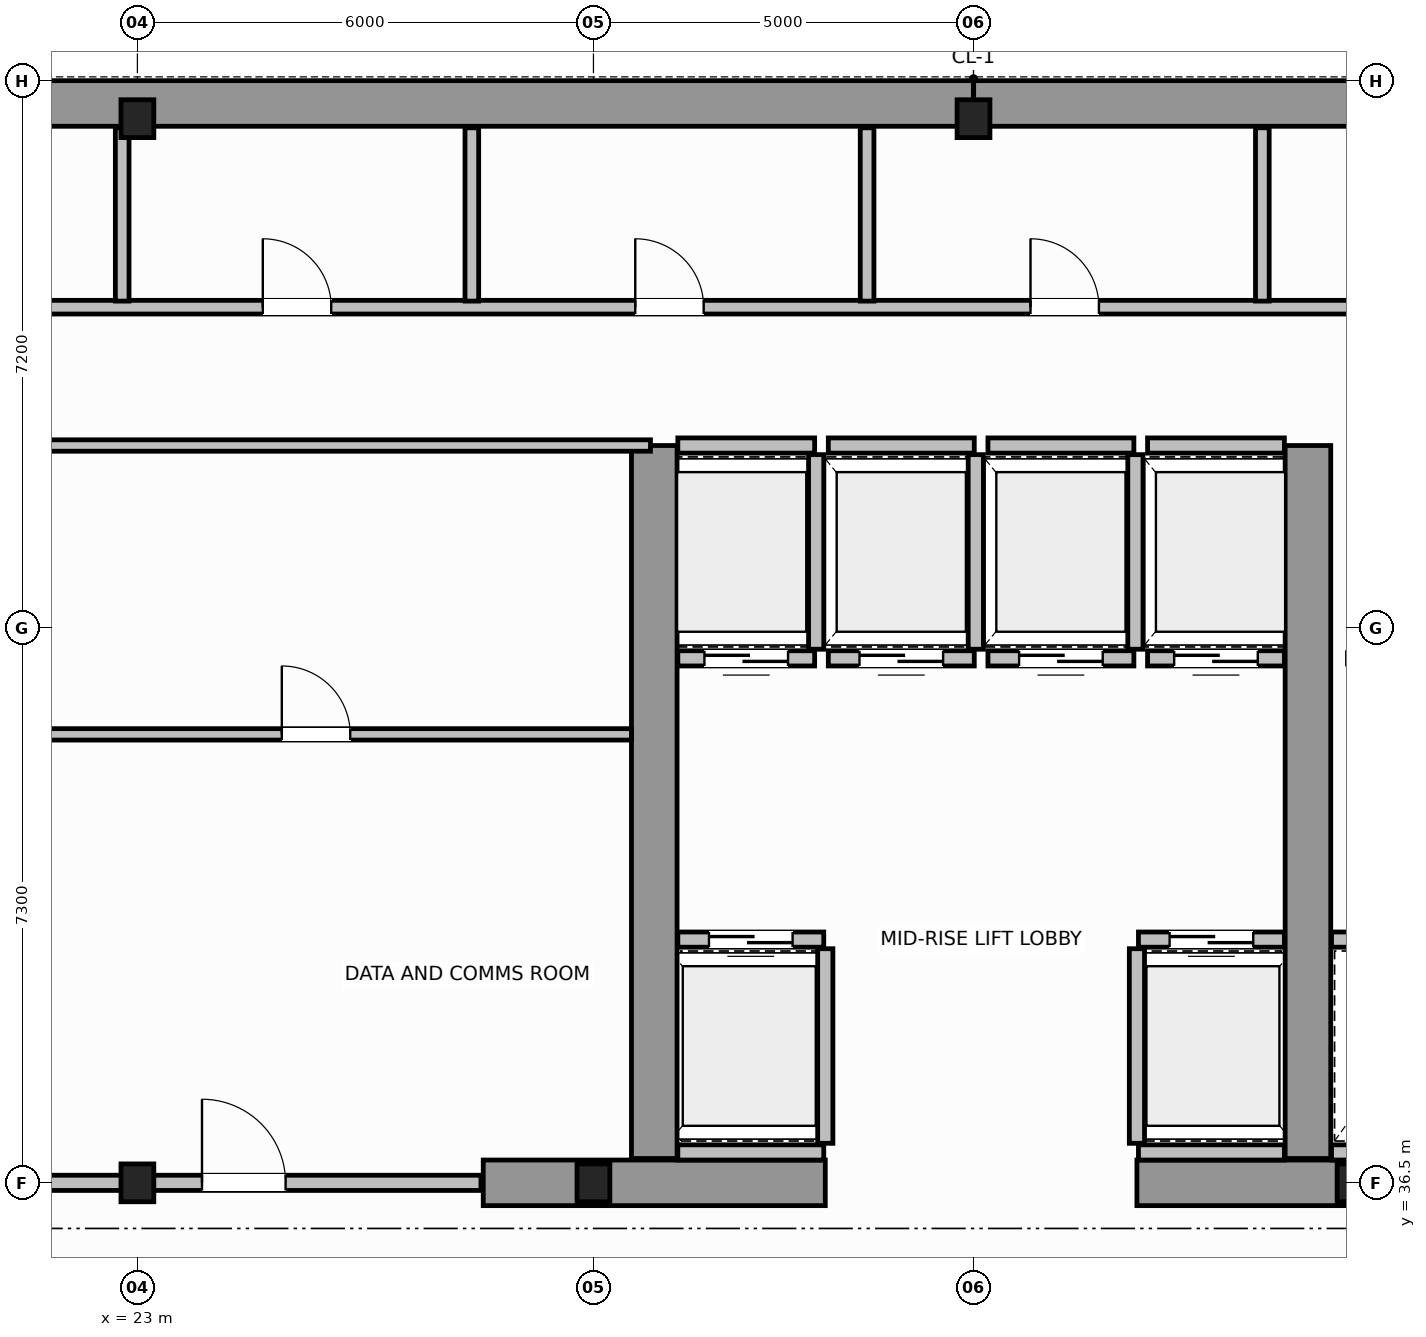
"""IFC4 building model, lengths in metres.
Left out: names, types, materials, properties, quantities, classifications, styles, units other than length and angle.
Written with IfcOpenShell. Run it as: python <this file> out.ifc"""

import sys

from ifc_helpers import new_model, si_unit, direction, frame, frame_2d, origin, origin_2d, place, context, subcontext, project, spatial, rectangle, i_section, extrude, source, transform, mapped, element, fill, save


model = new_model("IFC4")
c1 = context("Model", 3, precision=1e-05, world=origin(), true_north=direction((0.0, 1.0)))
c2 = subcontext(c1, "Body", "Model", "MODEL_VIEW")
j1 = project(units=[si_unit("LENGTHUNIT", "METRE"), si_unit("PLANEANGLEUNIT", "RADIAN")], contexts=[c1])
p1 = place(None, origin())
s1 = spatial("IfcSite", under=j1, at=p1, CompositionType="ELEMENT")
p2 = place(p1, origin())
s2 = spatial("IfcBuilding", under=s1, at=p2, CompositionType="ELEMENT")
p3 = place(p2, frame((0.0, 0.0, 188.0)))
s3 = spatial("IfcBuildingStorey", under=s2, at=p3, CompositionType="ELEMENT", Elevation=188.0)
m1 = source(origin(), c2, "Body", "SweptSolid", [
    extrude(i_section(OverallWidth=0.432, OverallDepth=0.498, WebThickness=0.055, FlangeThickness=0.068, FilletRadius=0.015, at=origin_2d()), origin(), (0.0, 0.0, 1.0), 3.8),
])
for number, where, z_axis, x_axis in (
    (1, (23.0, 36.5, 0.0), (0.0, 0.0, 1.0), (1.0, 0.0, 0.0)),
    (2, (29.0, 36.5, 0.0), (0.0, 0.0, 1.0), (1.0, 0.0, 0.0)),
    (3, (39.0, 36.5, 0.0), (0.0, 0.0, 1.0), (1.0, 0.0, 0.0)),
    (4, (23.0, 50.5, 0.0), (0.0, 0.0, 1.0), (1.0, 0.0, 0.0)),
    (5, (34.0, 50.5, 0.0), (0.0, 0.0, 1.0), (1.0, 0.0, 0.0)),
):
    element("IfcColumn", number, at=place(p3, frame(where, z_axis=z_axis, x_axis=x_axis)), inside=s3, PredefinedType="COLUMN", context=c2, shape_type="MappedRepresentation", body=[
        mapped(m1, transform((0.0, 0.0, 0.0), scale=1.0)),
    ])
for number, where, z_axis, x_axis in (
    (6, (14.304, 50.7, 0.0), (0.0, 0.0, 1.0), (1.0, 0.0, 0.0)),
    (7, (34.002, 50.7, 0.0), (0.0, 0.0, 1.0), (1.0, 0.0, 0.0)),
):
    element("IfcWall", number, at=place(p3, frame(where, z_axis=z_axis, x_axis=x_axis)), inside=s3, PredefinedType="SHEAR", context=c2, shape_type="SweptSolid", body=[
        extrude(rectangle(XDim=19.694, YDim=0.6, at=frame_2d((9.847, 0.0))), origin(), (0.0, 0.0, 1.0), 3.8),
    ])
for number, where, z_axis, x_axis in (
    (8, (27.55, 36.5, 0.0), (0.0, 0.0, 1.0), (1.0, 0.0, 0.0)),
    (9, (36.15, 36.5, 0.0), (0.0, 0.0, 1.0), (1.0, 0.0, 0.0)),
):
    element("IfcWall", number, at=place(p3, frame(where, z_axis=z_axis, x_axis=x_axis)), inside=s3, PredefinedType="SHEAR", context=c2, shape_type="SweptSolid", body=[
        extrude(rectangle(XDim=4.5, YDim=0.6, at=frame_2d((2.25, 0.0))), origin(), (0.0, 0.0, 1.0), 3.8),
    ])
for number, where, z_axis, x_axis in (
    (10, (29.8, 36.82, 0.0), (0.0, 0.0, 1.0), (0.0, 1.0, 0.0)),
    (11, (38.4, 36.82, 0.0), (0.0, 0.0, 1.0), (0.0, 1.0, 0.0)),
):
    element("IfcWall", number, at=place(p3, frame(where, z_axis=z_axis, x_axis=x_axis)), inside=s3, PredefinedType="SHEAR", context=c2, shape_type="SweptSolid", body=[
        extrude(rectangle(XDim=9.38, YDim=0.6, at=frame_2d((4.69, 0.0))), origin(), (0.0, 0.0, 1.0), 3.8),
    ])
p4 = place(p3, frame((30.11, 39.7, 0.0), z_axis=(0.0, 0.0, 1.0), x_axis=(1.0, 0.0, 0.0)))
e12 = element("IfcWall", 12, at=p4, inside=s3, PredefinedType="SOLIDWALL", context=c2, shape_type="SweptSolid", body=[
    extrude(rectangle(XDim=1.92, YDim=0.2, at=frame_2d((0.96, 0.0))), origin(), (0.0, 0.0, 1.0), 3.58),
])
p5 = place(p4, frame((0.41, 0.0, 0.0)))
e13 = element("IfcOpeningElement", 13, at=p5, cuts=e12, PredefinedType="OPENING", context=c2, shape_type="SweptSolid", body=[
    extrude(rectangle(XDim=1.1, YDim=2.15, at=frame_2d((0.55, 1.075))), frame((0.0, 0.11, 0.0), z_axis=(0.0, -1.0, 0.0), x_axis=(1.0, 0.0, 0.0)), (0.0, 0.0, 1.0), 0.22),
])
p6 = place(p3, frame((30.11, 36.9, 0.0), z_axis=(0.0, 0.0, 1.0), x_axis=(1.0, 0.0, 0.0)))
e14 = element("IfcWall", 14, at=p6, inside=s3, PredefinedType="SOLIDWALL", context=c2, shape_type="SweptSolid", body=[
    extrude(rectangle(XDim=1.92, YDim=0.2, at=frame_2d((0.96, 0.0))), origin(), (0.0, 0.0, 1.0), 3.58),
])
p7 = place(p3, frame((32.05, 37.02, 0.0), z_axis=(0.0, 0.0, 1.0), x_axis=(0.0, 1.0, 0.0)))
e15 = element("IfcWall", 15, at=p7, inside=s3, PredefinedType="SOLIDWALL", context=c2, shape_type="SweptSolid", body=[
    extrude(rectangle(XDim=2.56, YDim=0.2, at=frame_2d((1.28, 0.0))), origin(), (0.0, 0.0, 1.0), 3.58),
])
p8 = place(p3, frame((36.17, 39.7, 0.0), z_axis=(0.0, 0.0, 1.0), x_axis=(1.0, 0.0, 0.0)))
e16 = element("IfcWall", 16, at=p8, inside=s3, PredefinedType="SOLIDWALL", context=c2, shape_type="SweptSolid", body=[
    extrude(rectangle(XDim=1.92, YDim=0.2, at=frame_2d((0.96, 0.0))), origin(), (0.0, 0.0, 1.0), 3.58),
])
p9 = place(p8, frame((0.41, 0.0, 0.0)))
e17 = element("IfcOpeningElement", 17, at=p9, cuts=e16, PredefinedType="OPENING", context=c2, shape_type="SweptSolid", body=[
    extrude(rectangle(XDim=1.1, YDim=2.15, at=frame_2d((0.55, 1.075))), frame((0.0, 0.11, 0.0), z_axis=(0.0, -1.0, 0.0), x_axis=(1.0, 0.0, 0.0)), (0.0, 0.0, 1.0), 0.22),
])
p10 = place(p3, frame((36.17, 36.9, 0.0), z_axis=(0.0, 0.0, 1.0), x_axis=(1.0, 0.0, 0.0)))
e18 = element("IfcWall", 18, at=p10, inside=s3, PredefinedType="SOLIDWALL", context=c2, shape_type="SweptSolid", body=[
    extrude(rectangle(XDim=1.92, YDim=0.2, at=frame_2d((0.96, 0.0))), origin(), (0.0, 0.0, 1.0), 3.58),
])
p11 = place(p3, frame((36.15, 37.02, 0.0), z_axis=(0.0, 0.0, 1.0), x_axis=(0.0, 1.0, 0.0)))
e19 = element("IfcWall", 19, at=p11, inside=s3, PredefinedType="SOLIDWALL", context=c2, shape_type="SweptSolid", body=[
    extrude(rectangle(XDim=2.56, YDim=0.2, at=frame_2d((1.28, 0.0))), origin(), (0.0, 0.0, 1.0), 3.58),
])
p12 = place(p3, frame((30.11, 43.4, 0.0), z_axis=(0.0, 0.0, 1.0), x_axis=(1.0, 0.0, 0.0)))
e20 = element("IfcWall", 20, at=p12, inside=s3, PredefinedType="SOLIDWALL", context=c2, shape_type="SweptSolid", body=[
    extrude(rectangle(XDim=1.8, YDim=0.2, at=frame_2d((0.9, 0.0))), origin(), (0.0, 0.0, 1.0), 3.58),
])
p13 = place(p12, frame((0.35, 0.0, 0.0)))
e21 = element("IfcOpeningElement", 21, at=p13, cuts=e20, PredefinedType="OPENING", context=c2, shape_type="SweptSolid", body=[
    extrude(rectangle(XDim=1.1, YDim=2.15, at=frame_2d((0.55, 1.075))), frame((0.0, 0.11, 0.0), z_axis=(0.0, -1.0, 0.0), x_axis=(1.0, 0.0, 0.0)), (0.0, 0.0, 1.0), 0.22),
])
p14 = place(p3, frame((30.11, 46.2, 0.0), z_axis=(0.0, 0.0, 1.0), x_axis=(1.0, 0.0, 0.0)))
e22 = element("IfcWall", 22, at=p14, inside=s3, PredefinedType="SOLIDWALL", context=c2, shape_type="SweptSolid", body=[
    extrude(rectangle(XDim=1.8, YDim=0.2, at=frame_2d((0.9, 0.0))), origin(), (0.0, 0.0, 1.0), 3.58),
])
p15 = place(p3, frame((31.93, 43.52, 0.0), z_axis=(0.0, 0.0, 1.0), x_axis=(0.0, 1.0, 0.0)))
e23 = element("IfcWall", 23, at=p15, inside=s3, PredefinedType="SOLIDWALL", context=c2, shape_type="SweptSolid", body=[
    extrude(rectangle(XDim=2.56, YDim=0.2, at=frame_2d((1.28, 0.0))), origin(), (0.0, 0.0, 1.0), 3.58),
])
p16 = place(p3, frame((32.09, 43.4, 0.0), z_axis=(0.0, 0.0, 1.0), x_axis=(1.0, 0.0, 0.0)))
e24 = element("IfcWall", 24, at=p16, inside=s3, PredefinedType="SOLIDWALL", context=c2, shape_type="SweptSolid", body=[
    extrude(rectangle(XDim=1.92, YDim=0.2, at=frame_2d((0.96, 0.0))), origin(), (0.0, 0.0, 1.0), 3.58),
])
p17 = place(p16, frame((0.41, 0.0, 0.0)))
e25 = element("IfcOpeningElement", 25, at=p17, cuts=e24, PredefinedType="OPENING", context=c2, shape_type="SweptSolid", body=[
    extrude(rectangle(XDim=1.1, YDim=2.15, at=frame_2d((0.55, 1.075))), frame((0.0, 0.11, 0.0), z_axis=(0.0, -1.0, 0.0), x_axis=(1.0, 0.0, 0.0)), (0.0, 0.0, 1.0), 0.22),
])
p18 = place(p3, frame((32.09, 46.2, 0.0), z_axis=(0.0, 0.0, 1.0), x_axis=(1.0, 0.0, 0.0)))
e26 = element("IfcWall", 26, at=p18, inside=s3, PredefinedType="SOLIDWALL", context=c2, shape_type="SweptSolid", body=[
    extrude(rectangle(XDim=1.92, YDim=0.2, at=frame_2d((0.96, 0.0))), origin(), (0.0, 0.0, 1.0), 3.58),
])
p19 = place(p3, frame((34.03, 43.52, 0.0), z_axis=(0.0, 0.0, 1.0), x_axis=(0.0, 1.0, 0.0)))
e27 = element("IfcWall", 27, at=p19, inside=s3, PredefinedType="SOLIDWALL", context=c2, shape_type="SweptSolid", body=[
    extrude(rectangle(XDim=2.56, YDim=0.2, at=frame_2d((1.28, 0.0))), origin(), (0.0, 0.0, 1.0), 3.58),
])
p20 = place(p3, frame((34.19, 43.4, 0.0), z_axis=(0.0, 0.0, 1.0), x_axis=(1.0, 0.0, 0.0)))
e28 = element("IfcWall", 28, at=p20, inside=s3, PredefinedType="SOLIDWALL", context=c2, shape_type="SweptSolid", body=[
    extrude(rectangle(XDim=1.92, YDim=0.2, at=frame_2d((0.96, 0.0))), origin(), (0.0, 0.0, 1.0), 3.58),
])
p21 = place(p20, frame((0.41, 0.0, 0.0)))
e29 = element("IfcOpeningElement", 29, at=p21, cuts=e28, PredefinedType="OPENING", context=c2, shape_type="SweptSolid", body=[
    extrude(rectangle(XDim=1.1, YDim=2.15, at=frame_2d((0.55, 1.075))), frame((0.0, 0.11, 0.0), z_axis=(0.0, -1.0, 0.0), x_axis=(1.0, 0.0, 0.0)), (0.0, 0.0, 1.0), 0.22),
])
p22 = place(p3, frame((34.19, 46.2, 0.0), z_axis=(0.0, 0.0, 1.0), x_axis=(1.0, 0.0, 0.0)))
e30 = element("IfcWall", 30, at=p22, inside=s3, PredefinedType="SOLIDWALL", context=c2, shape_type="SweptSolid", body=[
    extrude(rectangle(XDim=1.92, YDim=0.2, at=frame_2d((0.96, 0.0))), origin(), (0.0, 0.0, 1.0), 3.58),
])
p23 = place(p3, frame((36.13, 43.52, 0.0), z_axis=(0.0, 0.0, 1.0), x_axis=(0.0, 1.0, 0.0)))
e31 = element("IfcWall", 31, at=p23, inside=s3, PredefinedType="SOLIDWALL", context=c2, shape_type="SweptSolid", body=[
    extrude(rectangle(XDim=2.56, YDim=0.2, at=frame_2d((1.28, 0.0))), origin(), (0.0, 0.0, 1.0), 3.58),
])
p24 = place(p3, frame((36.29, 43.4, 0.0), z_axis=(0.0, 0.0, 1.0), x_axis=(1.0, 0.0, 0.0)))
e32 = element("IfcWall", 32, at=p24, inside=s3, PredefinedType="SOLIDWALL", context=c2, shape_type="SweptSolid", body=[
    extrude(rectangle(XDim=1.8, YDim=0.2, at=frame_2d((0.9, 0.0))), origin(), (0.0, 0.0, 1.0), 3.58),
])
p25 = place(p24, frame((0.35, 0.0, 0.0)))
e33 = element("IfcOpeningElement", 33, at=p25, cuts=e32, PredefinedType="OPENING", context=c2, shape_type="SweptSolid", body=[
    extrude(rectangle(XDim=1.1, YDim=2.15, at=frame_2d((0.55, 1.075))), frame((0.0, 0.11, 0.0), z_axis=(0.0, -1.0, 0.0), x_axis=(1.0, 0.0, 0.0)), (0.0, 0.0, 1.0), 0.22),
])
p26 = place(p3, frame((36.29, 46.2, 0.0), z_axis=(0.0, 0.0, 1.0), x_axis=(1.0, 0.0, 0.0)))
e34 = element("IfcWall", 34, at=p26, inside=s3, PredefinedType="SOLIDWALL", context=c2, shape_type="SweptSolid", body=[
    extrude(rectangle(XDim=1.8, YDim=0.2, at=frame_2d((0.9, 0.0))), origin(), (0.0, 0.0, 1.0), 3.58),
])
for number, where, z_axis, x_axis in (
    (35, (38.71, 39.7, 0.0), (0.0, 0.0, 1.0), (1.0, 0.0, 0.0)),
    (36, (38.71, 36.9, 0.0), (0.0, 0.0, 1.0), (1.0, 0.0, 0.0)),
):
    element("IfcWall", number, at=place(p3, frame(where, z_axis=z_axis, x_axis=x_axis)), inside=s3, PredefinedType="SOLIDWALL", context=c2, shape_type="SweptSolid", body=[
        extrude(rectangle(XDim=1.92, YDim=0.2, at=frame_2d((0.96, 0.0))), origin(), (0.0, 0.0, 1.0), 3.58),
    ])
p27 = place(p3, frame((21.25, 36.5, 0.0), z_axis=(0.0, 0.0, 1.0), x_axis=(1.0, 0.0, 0.0)))
e37 = element("IfcWall", 37, at=p27, inside=s3, PredefinedType="SOLIDWALL", context=c2, shape_type="SweptSolid", body=[
    extrude(rectangle(XDim=6.27, YDim=0.2, at=frame_2d((3.135, 0.0))), origin(), (0.0, 0.0, 1.0), 2.57),
])
p28 = place(p27, frame((2.6, 0.0, 0.0)))
e38 = element("IfcOpeningElement", 38, at=p28, cuts=e37, PredefinedType="OPENING", context=c2, shape_type="SweptSolid", body=[
    extrude(rectangle(XDim=1.1, YDim=2.15, at=frame_2d((0.55, 1.075))), frame((0.0, 0.11, 0.0), z_axis=(0.0, -1.0, 0.0), x_axis=(1.0, 0.0, 0.0)), (0.0, 0.0, 1.0), 0.22),
])
p29 = place(p3, frame((21.25, 46.2, 0.0), z_axis=(0.0, 0.0, 1.0), x_axis=(1.0, 0.0, 0.0)))
e39 = element("IfcWall", 39, at=p29, inside=s3, PredefinedType="PARTITIONING", context=c2, shape_type="SweptSolid", body=[
    extrude(rectangle(XDim=8.5, YDim=0.15, at=frame_2d((4.25, 0.0))), origin(), (0.0, 0.0, 1.0), 3.58),
])
p30 = place(p3, frame((21.5, 42.4, 0.0), z_axis=(0.0, 0.0, 1.0), x_axis=(1.0, 0.0, 0.0)))
e40 = element("IfcWall", 40, at=p30, inside=s3, PredefinedType="PARTITIONING", context=c2, shape_type="SweptSolid", body=[
    extrude(rectangle(XDim=8.0, YDim=0.15, at=frame_2d((4.0, 0.0))), origin(), (0.0, 0.0, 1.0), 3.58),
])
p31 = place(p30, frame((3.4, 0.0, 0.0)))
e41 = element("IfcOpeningElement", 41, at=p31, cuts=e40, PredefinedType="OPENING", context=c2, shape_type="SweptSolid", body=[
    extrude(rectangle(XDim=0.9, YDim=2.1, at=frame_2d((0.45, 1.05))), frame((0.0, 0.085, 0.0), z_axis=(0.0, -1.0, 0.0), x_axis=(1.0, 0.0, 0.0)), (0.0, 0.0, 1.0), 0.17),
])
p32 = place(p3, frame((18.62, 48.02, 0.0), z_axis=(0.0, 0.0, 1.0), x_axis=(1.0, 0.0, 0.0)))
e42 = element("IfcWall", 42, at=p32, inside=s3, PredefinedType="PLUMBINGWALL", context=c2, shape_type="SweptSolid", body=[
    extrude(rectangle(XDim=30.76, YDim=0.18, at=frame_2d((15.38, 0.0))), origin(), (0.0, 0.0, 1.0), 3.58),
])
p33 = place(p32, frame((1.655, 0.0, 0.0)))
e43 = element("IfcOpeningElement", 43, at=p33, cuts=e42, PredefinedType="OPENING", context=c2, shape_type="SweptSolid", body=[
    extrude(rectangle(XDim=0.9, YDim=2.15, at=frame_2d((0.45, 1.075))), frame((0.0, 0.1, 0.0), z_axis=(0.0, -1.0, 0.0), x_axis=(1.0, 0.0, 0.0)), (0.0, 0.0, 1.0), 0.2),
])
p34 = place(p32, frame((6.03, 0.0, 0.0)))
e44 = element("IfcOpeningElement", 44, at=p34, cuts=e42, PredefinedType="OPENING", context=c2, shape_type="SweptSolid", body=[
    extrude(rectangle(XDim=0.9, YDim=2.15, at=frame_2d((0.45, 1.075))), frame((0.0, 0.1, 0.0), z_axis=(0.0, -1.0, 0.0), x_axis=(1.0, 0.0, 0.0)), (0.0, 0.0, 1.0), 0.2),
])
p35 = place(p32, frame((10.93, 0.0, 0.0)))
e45 = element("IfcOpeningElement", 45, at=p35, cuts=e42, PredefinedType="OPENING", context=c2, shape_type="SweptSolid", body=[
    extrude(rectangle(XDim=0.9, YDim=2.15, at=frame_2d((0.45, 1.075))), frame((0.0, 0.1, 0.0), z_axis=(0.0, -1.0, 0.0), x_axis=(1.0, 0.0, 0.0)), (0.0, 0.0, 1.0), 0.2),
])
p36 = place(p32, frame((16.13, 0.0, 0.0)))
e46 = element("IfcOpeningElement", 46, at=p36, cuts=e42, PredefinedType="OPENING", context=c2, shape_type="SweptSolid", body=[
    extrude(rectangle(XDim=0.9, YDim=2.15, at=frame_2d((0.45, 1.075))), frame((0.0, 0.1, 0.0), z_axis=(0.0, -1.0, 0.0), x_axis=(1.0, 0.0, 0.0)), (0.0, 0.0, 1.0), 0.2),
])
p37 = place(p32, frame((21.73, 0.0, 0.0)))
e47 = element("IfcOpeningElement", 47, at=p37, cuts=e42, PredefinedType="OPENING", context=c2, shape_type="SweptSolid", body=[
    extrude(rectangle(XDim=0.9, YDim=2.15, at=frame_2d((0.45, 1.075))), frame((0.0, 0.1, 0.0), z_axis=(0.0, -1.0, 0.0), x_axis=(1.0, 0.0, 0.0)), (0.0, 0.0, 1.0), 0.2),
])
p38 = place(p32, frame((27.505, 0.0, 0.0)))
e48 = element("IfcOpeningElement", 48, at=p38, cuts=e42, PredefinedType="OPENING", context=c2, shape_type="SweptSolid", body=[
    extrude(rectangle(XDim=0.9, YDim=2.15, at=frame_2d((0.45, 1.075))), frame((0.0, 0.1, 0.0), z_axis=(0.0, -1.0, 0.0), x_axis=(1.0, 0.0, 0.0)), (0.0, 0.0, 1.0), 0.2),
])
p39 = place(p3, frame((22.8, 48.1, 0.0), z_axis=(0.0, 0.0, 1.0), x_axis=(0.0, 1.0, 0.0)))
e49 = element("IfcWall", 49, at=p39, inside=s3, PredefinedType="PLUMBINGWALL", context=c2, shape_type="SweptSolid", body=[
    extrude(rectangle(XDim=2.28, YDim=0.18, at=frame_2d((1.14, 0.0))), origin(), (0.0, 0.0, 1.0), 2.97),
])
for number, where, z_axis, x_axis in (
    (50, (27.4, 48.1, 0.0), (0.0, 0.0, 1.0), (0.0, 1.0, 0.0)),
    (51, (32.6, 48.1, 0.0), (0.0, 0.0, 1.0), (0.0, 1.0, 0.0)),
    (52, (37.8, 48.1, 0.0), (0.0, 0.0, 1.0), (0.0, 1.0, 0.0)),
):
    element("IfcWall", number, at=place(p3, frame(where, z_axis=z_axis, x_axis=x_axis)), inside=s3, PredefinedType="PLUMBINGWALL", context=c2, shape_type="SweptSolid", body=[
        extrude(rectangle(XDim=2.28, YDim=0.18, at=frame_2d((1.14, 0.0))), origin(), (0.0, 0.0, 1.0), 3.58),
    ])
m2 = source(origin(), c2, "Body", "SweptSolid", [
    extrude(rectangle(XDim=1.1, YDim=2.15, at=frame_2d((0.55, 1.075))), frame((0.0, 0.025, 0.0), z_axis=(0.0, -1.0, 0.0), x_axis=(1.0, 0.0, 0.0)), (0.0, 0.0, 1.0), 0.05),
])
p40 = place(p5, origin())
e53 = element("IfcDoor", 53, at=p40, inside=s3, OperationType="DOUBLE_DOOR_SLIDING", PredefinedType="DOOR", context=c2, shape_type="MappedRepresentation", body=[
    mapped(m2, transform((0.0, 0.0, 0.0), scale=1.0)),
])
fill(e13, e53)
p41 = place(p9, origin())
e54 = element("IfcDoor", 54, at=p41, inside=s3, OperationType="DOUBLE_DOOR_SLIDING", PredefinedType="DOOR", context=c2, shape_type="MappedRepresentation", body=[
    mapped(m2, transform((0.0, 0.0, 0.0), scale=1.0)),
])
fill(e17, e54)
p42 = place(p13, origin())
e55 = element("IfcDoor", 55, at=p42, inside=s3, OperationType="DOUBLE_DOOR_SLIDING", PredefinedType="DOOR", context=c2, shape_type="MappedRepresentation", body=[
    mapped(m2, transform((0.0, 0.0, 0.0), scale=1.0)),
])
fill(e21, e55)
p43 = place(p17, origin())
e56 = element("IfcDoor", 56, at=p43, inside=s3, OperationType="DOUBLE_DOOR_SLIDING", PredefinedType="DOOR", context=c2, shape_type="MappedRepresentation", body=[
    mapped(m2, transform((0.0, 0.0, 0.0), scale=1.0)),
])
fill(e25, e56)
p44 = place(p21, origin())
e57 = element("IfcDoor", 57, at=p44, inside=s3, OperationType="DOUBLE_DOOR_SLIDING", PredefinedType="DOOR", context=c2, shape_type="MappedRepresentation", body=[
    mapped(m2, transform((0.0, 0.0, 0.0), scale=1.0)),
])
fill(e29, e57)
p45 = place(p25, origin())
e58 = element("IfcDoor", 58, at=p45, inside=s3, OperationType="DOUBLE_DOOR_SLIDING", PredefinedType="DOOR", context=c2, shape_type="MappedRepresentation", body=[
    mapped(m2, transform((0.0, 0.0, 0.0), scale=1.0)),
])
fill(e33, e58)
p46 = place(p28, origin())
e59 = element("IfcDoor", 59, at=p46, inside=s3, OperationType="SINGLE_SWING_LEFT", PredefinedType="DOOR", context=c2, shape_type="MappedRepresentation", body=[
    mapped(m2, transform((0.0, 0.0, 0.0), scale=1.0)),
])
fill(e38, e59)
m3 = source(origin(), c2, "Body", "SweptSolid", [
    extrude(rectangle(XDim=0.9, YDim=2.1, at=frame_2d((0.45, 1.05))), frame((0.0, 0.025, 0.0), z_axis=(0.0, -1.0, 0.0), x_axis=(1.0, 0.0, 0.0)), (0.0, 0.0, 1.0), 0.05),
])
p47 = place(p31, origin())
e60 = element("IfcDoor", 60, at=p47, inside=s3, OperationType="SINGLE_SWING_RIGHT", PredefinedType="DOOR", context=c2, shape_type="MappedRepresentation", body=[
    mapped(m3, transform((0.0, 0.0, 0.0), scale=1.0)),
])
fill(e41, e60)
m4 = source(origin(), c2, "Body", "SweptSolid", [
    extrude(rectangle(XDim=0.9, YDim=2.15, at=frame_2d((0.45, 1.075))), frame((0.0, 0.025, 0.0), z_axis=(0.0, -1.0, 0.0), x_axis=(1.0, 0.0, 0.0)), (0.0, 0.0, 1.0), 0.05),
])
p48 = place(p34, origin())
e61 = element("IfcDoor", 61, at=p48, inside=s3, OperationType="SINGLE_SWING_RIGHT", PredefinedType="DOOR", context=c2, shape_type="MappedRepresentation", body=[
    mapped(m4, transform((0.0, 0.0, 0.0), scale=1.0)),
])
fill(e44, e61)
p49 = place(p35, origin())
e62 = element("IfcDoor", 62, at=p49, inside=s3, OperationType="SINGLE_SWING_LEFT", PredefinedType="DOOR", context=c2, shape_type="MappedRepresentation", body=[
    mapped(m4, transform((0.0, 0.0, 0.0), scale=1.0)),
])
fill(e45, e62)
p50 = place(p36, origin())
e63 = element("IfcDoor", 63, at=p50, inside=s3, OperationType="SINGLE_SWING_RIGHT", PredefinedType="DOOR", context=c2, shape_type="MappedRepresentation", body=[
    mapped(m4, transform((0.0, 0.0, 0.0), scale=1.0)),
])
fill(e46, e63)
save(model, sys.argv[1])
